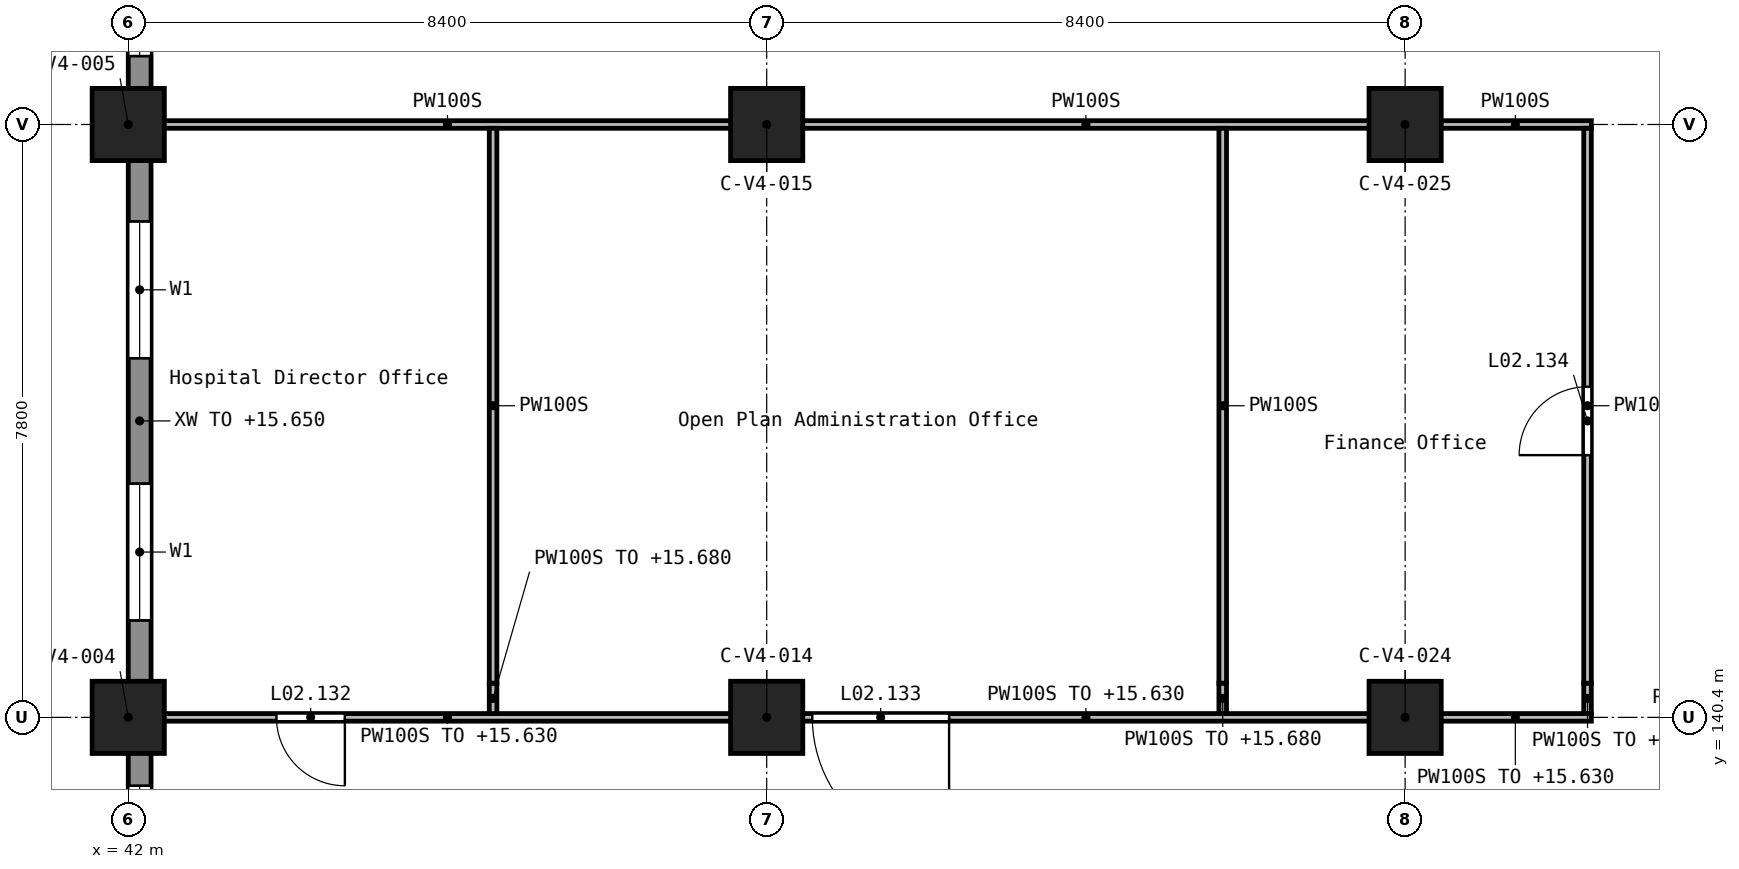
"""IFC4 building model, lengths in metres.
Left out: names, types, materials, properties, quantities, classifications, styles, units other than length and angle.
Written with IfcOpenShell. Run it as: python <this file> out.ifc"""

import sys

from ifc_helpers import new_model, si_unit, direction, frame, frame_2d, origin, origin_2d, place, context, subcontext, project, spatial, rectangle, extrude, element, fill, save


model = new_model("IFC4")
c1 = context("Model", 3, precision=1e-05, world=origin(), true_north=direction((0.0, 1.0)))
c2 = subcontext(c1, "Body", "Model", "MODEL_VIEW")
j1 = project(units=[si_unit("LENGTHUNIT", "METRE"), si_unit("PLANEANGLEUNIT", "RADIAN")], contexts=[c1])
p1 = place(None, origin())
s1 = spatial("IfcSite", under=j1, at=p1, CompositionType="ELEMENT")
p2 = place(p1, origin())
s2 = spatial("IfcBuilding", under=s1, at=p2, CompositionType="ELEMENT")
p3 = place(p2, frame((0.0, 0.0, 12.6)))
s3 = spatial("IfcBuildingStorey", under=s2, at=p3, CompositionType="ELEMENT", Elevation=12.6)
for number, where, z_axis, x_axis in (
    (1, (42.0, 140.4, 0.0), (0.0, 0.0, 1.0), (1.0, 0.0, 0.0)),
    (2, (42.0, 148.2, 0.0), (0.0, 0.0, 1.0), (1.0, 0.0, 0.0)),
    (3, (50.4, 140.4, 0.0), (0.0, 0.0, 1.0), (1.0, 0.0, 0.0)),
    (4, (50.4, 148.2, 0.0), (0.0, 0.0, 1.0), (1.0, 0.0, 0.0)),
    (5, (58.8, 140.4, 0.0), (0.0, 0.0, 1.0), (1.0, 0.0, 0.0)),
    (6, (58.8, 148.2, 0.0), (0.0, 0.0, 1.0), (1.0, 0.0, 0.0)),
):
    element("IfcColumn", number, at=place(p3, frame(where, z_axis=z_axis, x_axis=x_axis)), inside=s3, PredefinedType="COLUMN", context=c2, shape_type="SweptSolid", body=[
        extrude(rectangle(XDim=0.95, YDim=0.95, at=origin_2d()), origin(), (0.0, 0.0, 1.0), 4.2),
    ])
p4 = place(p3, frame((42.15, 151.35, 0.0), z_axis=(0.0, 0.0, 1.0), x_axis=(0.0, -1.0, 0.0)))
e7 = element("IfcWall", 7, at=p4, inside=s3, PredefinedType="STANDARD", context=c2, shape_type="SweptSolid", body=[
    extrude(rectangle(XDim=2.7, YDim=0.3, at=frame_2d((1.35, 0.0))), origin(), (0.0, 0.0, 1.0), 3.05),
])
p5 = place(p4, frame((0.45, 0.0, 0.9)))
e8 = element("IfcOpeningElement", 8, at=p5, cuts=e7, PredefinedType="OPENING", context=c2, shape_type="SweptSolid", body=[
    extrude(rectangle(XDim=1.8, YDim=1.5, at=frame_2d((0.9, 0.75))), frame((0.0, 0.16, 0.0), z_axis=(0.0, -1.0, 0.0), x_axis=(1.0, 0.0, 0.0)), (0.0, 0.0, 1.0), 0.32),
])
p6 = place(p3, frame((42.15, 147.75, 0.0), z_axis=(0.0, 0.0, 1.0), x_axis=(0.0, -1.0, 0.0)))
e9 = element("IfcWall", 9, at=p6, inside=s3, PredefinedType="STANDARD", context=c2, shape_type="SweptSolid", body=[
    extrude(rectangle(XDim=6.9, YDim=0.3, at=frame_2d((3.45, 0.0))), origin(), (0.0, 0.0, 1.0), 3.05),
])
p7 = place(p6, frame((0.825, 0.0, 0.9)))
e10 = element("IfcOpeningElement", 10, at=p7, cuts=e9, PredefinedType="OPENING", context=c2, shape_type="SweptSolid", body=[
    extrude(rectangle(XDim=1.8, YDim=1.5, at=frame_2d((0.9, 0.75))), frame((0.0, 0.16, 0.0), z_axis=(0.0, -1.0, 0.0), x_axis=(1.0, 0.0, 0.0)), (0.0, 0.0, 1.0), 0.32),
])
p8 = place(p6, frame((4.275, 0.0, 0.9)))
e11 = element("IfcOpeningElement", 11, at=p8, cuts=e9, PredefinedType="OPENING", context=c2, shape_type="SweptSolid", body=[
    extrude(rectangle(XDim=1.8, YDim=1.5, at=frame_2d((0.9, 0.75))), frame((0.0, 0.16, 0.0), z_axis=(0.0, -1.0, 0.0), x_axis=(1.0, 0.0, 0.0)), (0.0, 0.0, 1.0), 0.32),
])
p9 = place(p3, frame((42.15, 139.95, 0.0), z_axis=(0.0, 0.0, 1.0), x_axis=(0.0, -1.0, 0.0)))
e12 = element("IfcWall", 12, at=p9, inside=s3, PredefinedType="STANDARD", context=c2, shape_type="SweptSolid", body=[
    extrude(rectangle(XDim=2.7, YDim=0.3, at=frame_2d((1.35, 0.0))), origin(), (0.0, 0.0, 1.0), 3.05),
])
p10 = place(p9, frame((0.45, 0.0, 0.9)))
e13 = element("IfcOpeningElement", 13, at=p10, cuts=e12, PredefinedType="OPENING", context=c2, shape_type="SweptSolid", body=[
    extrude(rectangle(XDim=1.8, YDim=1.5, at=frame_2d((0.9, 0.75))), frame((0.0, 0.16, 0.0), z_axis=(0.0, -1.0, 0.0), x_axis=(1.0, 0.0, 0.0)), (0.0, 0.0, 1.0), 0.32),
])
p11 = place(p3, frame((61.25, 140.4, 0.0), z_axis=(0.0, 0.0, 1.0), x_axis=(-1.0, 0.0, 0.0)))
e14 = element("IfcWall", 14, at=p11, inside=s3, PredefinedType="PARTITIONING", context=c2, shape_type="SweptSolid", body=[
    extrude(rectangle(XDim=2.0, YDim=0.1, at=frame_2d((1.0, 0.0))), origin(), (0.0, 0.0, 1.0), 3.03),
])
p12 = place(p3, frame((58.35, 140.4, 0.0), z_axis=(0.0, 0.0, 1.0), x_axis=(-1.0, 0.0, 0.0)))
e15 = element("IfcWall", 15, at=p12, inside=s3, PredefinedType="PARTITIONING", context=c2, shape_type="SweptSolid", body=[
    extrude(rectangle(XDim=7.5, YDim=0.1, at=frame_2d((3.75, 0.0))), origin(), (0.0, 0.0, 1.0), 3.03),
])
p13 = place(p12, frame((5.55, 0.0, 0.0)))
e16 = element("IfcOpeningElement", 16, at=p13, cuts=e15, PredefinedType="OPENING", context=c2, shape_type="SweptSolid", body=[
    extrude(rectangle(XDim=1.8, YDim=2.1, at=frame_2d((0.9, 1.05))), frame((0.0, 0.06, 0.0), z_axis=(0.0, -1.0, 0.0), x_axis=(1.0, 0.0, 0.0)), (0.0, 0.0, 1.0), 0.12),
])
p14 = place(p3, frame((49.95, 140.4, 0.0), z_axis=(0.0, 0.0, 1.0), x_axis=(-1.0, 0.0, 0.0)))
e17 = element("IfcWall", 17, at=p14, inside=s3, PredefinedType="PARTITIONING", context=c2, shape_type="SweptSolid", body=[
    extrude(rectangle(XDim=7.5, YDim=0.1, at=frame_2d((3.75, 0.0))), origin(), (0.0, 0.0, 1.0), 3.03),
])
p15 = place(p14, frame((5.1, 0.0, 0.0)))
e18 = element("IfcOpeningElement", 18, at=p15, cuts=e17, PredefinedType="OPENING", context=c2, shape_type="SweptSolid", body=[
    extrude(rectangle(XDim=0.9, YDim=2.1, at=frame_2d((0.45, 1.05))), frame((0.0, 0.06, 0.0), z_axis=(0.0, -1.0, 0.0), x_axis=(1.0, 0.0, 0.0)), (0.0, 0.0, 1.0), 0.12),
])
p16 = place(p3, frame((61.25, 148.2, 0.0), z_axis=(0.0, 0.0, 1.0), x_axis=(-1.0, 0.0, 0.0)))
e19 = element("IfcWall", 19, at=p16, inside=s3, PredefinedType="PARTITIONING", context=c2, shape_type="SweptSolid", body=[
    extrude(rectangle(XDim=2.0, YDim=0.1, at=frame_2d((1.0, 0.0))), origin(), (0.0, 0.0, 1.0), 3.85),
])
for number, where, z_axis, x_axis in (
    (20, (58.35, 148.2, 0.0), (0.0, 0.0, 1.0), (-1.0, 0.0, 0.0)),
    (21, (49.95, 148.2, 0.0), (0.0, 0.0, 1.0), (-1.0, 0.0, 0.0)),
):
    element("IfcWall", number, at=place(p3, frame(where, z_axis=z_axis, x_axis=x_axis)), inside=s3, PredefinedType="PARTITIONING", context=c2, shape_type="SweptSolid", body=[
        extrude(rectangle(XDim=7.5, YDim=0.1, at=frame_2d((3.75, 0.0))), origin(), (0.0, 0.0, 1.0), 3.85),
    ])
p17 = place(p3, frame((46.8, 140.45, 0.0), z_axis=(0.0, 0.0, 1.0), x_axis=(0.0, 1.0, 0.0)))
e22 = element("IfcWall", 22, at=p17, inside=s3, PredefinedType="PARTITIONING", context=c2, shape_type="SweptSolid", body=[
    extrude(rectangle(XDim=0.4, YDim=0.1, at=frame_2d((0.2, 0.0))), origin(), (0.0, 0.0, 1.0), 3.08),
])
p18 = place(p3, frame((46.8, 140.85, 0.0), z_axis=(0.0, 0.0, 1.0), x_axis=(0.0, 1.0, 0.0)))
e23 = element("IfcWall", 23, at=p18, inside=s3, PredefinedType="PARTITIONING", context=c2, shape_type="SweptSolid", body=[
    extrude(rectangle(XDim=7.3, YDim=0.1, at=frame_2d((3.65, 0.0))), origin(), (0.0, 0.0, 1.0), 3.85),
])
p19 = place(p3, frame((56.4, 140.45, 0.0), z_axis=(0.0, 0.0, 1.0), x_axis=(0.0, 1.0, 0.0)))
e24 = element("IfcWall", 24, at=p19, inside=s3, PredefinedType="PARTITIONING", context=c2, shape_type="SweptSolid", body=[
    extrude(rectangle(XDim=0.4, YDim=0.1, at=frame_2d((0.2, 0.0))), origin(), (0.0, 0.0, 1.0), 3.08),
])
p20 = place(p3, frame((56.4, 140.85, 0.0), z_axis=(0.0, 0.0, 1.0), x_axis=(0.0, 1.0, 0.0)))
e25 = element("IfcWall", 25, at=p20, inside=s3, PredefinedType="PARTITIONING", context=c2, shape_type="SweptSolid", body=[
    extrude(rectangle(XDim=7.3, YDim=0.1, at=frame_2d((3.65, 0.0))), origin(), (0.0, 0.0, 1.0), 3.85),
])
p21 = place(p3, frame((61.2, 140.45, 0.0), z_axis=(0.0, 0.0, 1.0), x_axis=(0.0, 1.0, 0.0)))
e26 = element("IfcWall", 26, at=p21, inside=s3, PredefinedType="PARTITIONING", context=c2, shape_type="SweptSolid", body=[
    extrude(rectangle(XDim=0.4, YDim=0.1, at=frame_2d((0.2, 0.0))), origin(), (0.0, 0.0, 1.0), 3.08),
])
p22 = place(p3, frame((61.2, 140.85, 0.0), z_axis=(0.0, 0.0, 1.0), x_axis=(0.0, 1.0, 0.0)))
e27 = element("IfcWall", 27, at=p22, inside=s3, PredefinedType="PARTITIONING", context=c2, shape_type="SweptSolid", body=[
    extrude(rectangle(XDim=7.3, YDim=0.1, at=frame_2d((3.65, 0.0))), origin(), (0.0, 0.0, 1.0), 3.85),
])
p23 = place(p22, frame((3.0, 0.0, 0.0)))
e28 = element("IfcOpeningElement", 28, at=p23, cuts=e27, PredefinedType="OPENING", context=c2, shape_type="SweptSolid", body=[
    extrude(rectangle(XDim=0.9, YDim=2.1, at=frame_2d((0.45, 1.05))), frame((0.0, 0.06, 0.0), z_axis=(0.0, -1.0, 0.0), x_axis=(1.0, 0.0, 0.0)), (0.0, 0.0, 1.0), 0.12),
])
p24 = place(p5, origin())
e29 = element("IfcWindow", 29, at=p24, inside=s3, PartitioningType="SINGLE_PANEL", PredefinedType="WINDOW", context=c2, shape_type="SweptSolid", body=[
    extrude(rectangle(XDim=1.8, YDim=1.5, at=frame_2d((0.9, 0.75))), frame((0.0, 0.03, 0.0), z_axis=(0.0, -1.0, 0.0), x_axis=(1.0, 0.0, 0.0)), (0.0, 0.0, 1.0), 0.06),
])
fill(e8, e29)
p25 = place(p7, origin())
e30 = element("IfcWindow", 30, at=p25, inside=s3, PartitioningType="SINGLE_PANEL", PredefinedType="WINDOW", context=c2, shape_type="SweptSolid", body=[
    extrude(rectangle(XDim=1.8, YDim=1.5, at=frame_2d((0.9, 0.75))), frame((0.0, 0.03, 0.0), z_axis=(0.0, -1.0, 0.0), x_axis=(1.0, 0.0, 0.0)), (0.0, 0.0, 1.0), 0.06),
])
fill(e10, e30)
p26 = place(p8, origin())
e31 = element("IfcWindow", 31, at=p26, inside=s3, PartitioningType="SINGLE_PANEL", PredefinedType="WINDOW", context=c2, shape_type="SweptSolid", body=[
    extrude(rectangle(XDim=1.8, YDim=1.5, at=frame_2d((0.9, 0.75))), frame((0.0, 0.03, 0.0), z_axis=(0.0, -1.0, 0.0), x_axis=(1.0, 0.0, 0.0)), (0.0, 0.0, 1.0), 0.06),
])
fill(e11, e31)
p27 = place(p10, origin())
e32 = element("IfcWindow", 32, at=p27, inside=s3, PartitioningType="SINGLE_PANEL", PredefinedType="WINDOW", context=c2, shape_type="SweptSolid", body=[
    extrude(rectangle(XDim=1.8, YDim=1.5, at=frame_2d((0.9, 0.75))), frame((0.0, 0.03, 0.0), z_axis=(0.0, -1.0, 0.0), x_axis=(1.0, 0.0, 0.0)), (0.0, 0.0, 1.0), 0.06),
])
fill(e13, e32)
p28 = place(p15, frame((0.9, 0.0, 0.0), z_axis=(0.0, 0.0, 1.0), x_axis=(-1.0, 0.0, 0.0)))
e33 = element("IfcDoor", 33, at=p28, inside=s3, OperationType="SINGLE_SWING_LEFT", PredefinedType="DOOR", context=c2, shape_type="SweptSolid", body=[
    extrude(rectangle(XDim=0.9, YDim=2.1, at=frame_2d((0.45, 1.05))), frame((0.0, 0.025, 0.0), z_axis=(0.0, -1.0, 0.0), x_axis=(1.0, 0.0, 0.0)), (0.0, 0.0, 1.0), 0.05),
])
fill(e18, e33)
p29 = place(p13, frame((1.8, 0.0, 0.0), z_axis=(0.0, 0.0, 1.0), x_axis=(-1.0, 0.0, 0.0)))
e34 = element("IfcDoor", 34, at=p29, inside=s3, OperationType="DOUBLE_DOOR_SINGLE_SWING", PredefinedType="DOOR", context=c2, shape_type="SweptSolid", body=[
    extrude(rectangle(XDim=1.8, YDim=2.1, at=frame_2d((0.9, 1.05))), frame((0.0, 0.025, 0.0), z_axis=(0.0, -1.0, 0.0), x_axis=(1.0, 0.0, 0.0)), (0.0, 0.0, 1.0), 0.05),
])
fill(e16, e34)
p30 = place(p23, origin())
e35 = element("IfcDoor", 35, at=p30, inside=s3, OperationType="SINGLE_SWING_LEFT", PredefinedType="DOOR", context=c2, shape_type="SweptSolid", body=[
    extrude(rectangle(XDim=0.9, YDim=2.1, at=frame_2d((0.45, 1.05))), frame((0.0, 0.025, 0.0), z_axis=(0.0, -1.0, 0.0), x_axis=(1.0, 0.0, 0.0)), (0.0, 0.0, 1.0), 0.05),
])
fill(e28, e35)
save(model, sys.argv[1])
